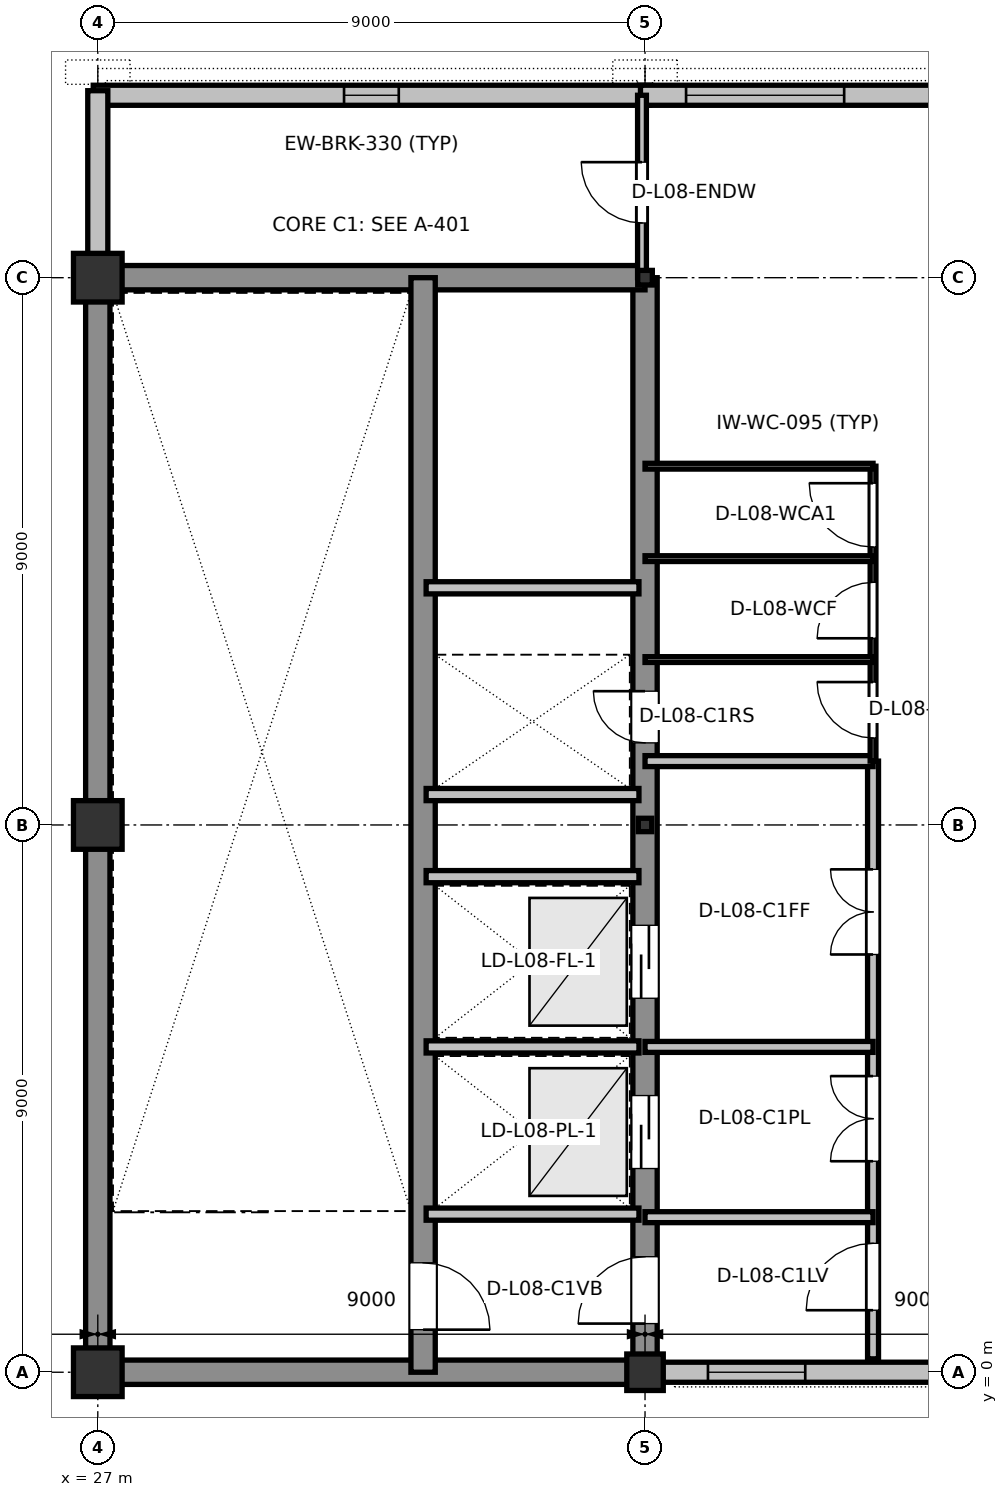
"""IFC4 building model, lengths in metres.
Left out: names, types, materials, properties, quantities, classifications, styles, units other than length and angle.
Written with IfcOpenShell. Run it as: python <this file> out.ifc"""

import sys

from ifc_helpers import new_model, si_unit, direction, frame, frame_2d, origin, origin_2d, place, context, subcontext, project, spatial, rectangle, hollow_rectangle, i_section, extrude, element, fill, save


model = new_model("IFC4")
c1 = context("Model", 3, precision=1e-05, world=origin(), true_north=direction((0.0, 1.0)))
c2 = subcontext(c1, "Body", "Model", "MODEL_VIEW")
j1 = project(units=[si_unit("LENGTHUNIT", "METRE"), si_unit("PLANEANGLEUNIT", "RADIAN")], contexts=[c1])
p1 = place(None, origin())
s1 = spatial("IfcSite", under=j1, at=p1, CompositionType="ELEMENT")
p2 = place(p1, origin())
s2 = spatial("IfcBuilding", under=s1, at=p2, CompositionType="ELEMENT")
p3 = place(p2, frame((0.0, 0.0, 36.0)))
s3 = spatial("IfcBuildingStorey", under=s2, at=p3, CompositionType="ELEMENT", Elevation=36.0)
for number, where, z_axis, x_axis in (
    (1, (27.0, 0.0, 0.0), (0.0, 0.0, 1.0), (1.0, 0.0, 0.0)),
    (2, (27.0, 9.0, 0.0), (0.0, 0.0, 1.0), (1.0, 0.0, 0.0)),
    (3, (27.0, 18.0, 0.0), (0.0, 0.0, 1.0), (1.0, 0.0, 0.0)),
):
    element("IfcColumn", number, at=place(p3, frame(where, z_axis=z_axis, x_axis=x_axis)), inside=s3, PredefinedType="COLUMN", context=c2, shape_type="SweptSolid", body=[
        extrude(rectangle(XDim=0.8, YDim=0.8, at=origin_2d()), origin(), (0.0, 0.0, 1.0), 4.2),
    ])
p4 = place(p3, frame((36.0, 0.0, 0.0), z_axis=(0.0, 0.0, 1.0), x_axis=(1.0, 0.0, 0.0)))
e4 = element("IfcColumn", 4, at=p4, inside=s3, PredefinedType="COLUMN", context=c2, shape_type="SweptSolid", body=[
    extrude(rectangle(XDim=0.6, YDim=0.6, at=origin_2d()), origin(), (0.0, 0.0, 1.0), 4.2),
])
p5 = place(p3, frame((36.0, 9.0, 0.0), z_axis=(0.0, 0.0, 1.0), x_axis=(1.0, 0.0, 0.0)))
e5 = element("IfcColumn", 5, at=p5, inside=s3, PredefinedType="COLUMN", context=c2, shape_type="SweptSolid", body=[
    extrude(hollow_rectangle(XDim=0.22, YDim=0.22, WallThickness=0.012, at=origin_2d()), origin(), (0.0, 0.0, 1.0), 4.2),
])
p6 = place(p3, frame((36.0, 18.0, 0.0), z_axis=(0.0, 0.0, 1.0), x_axis=(1.0, 0.0, 0.0)))
e6 = element("IfcColumn", 6, at=p6, inside=s3, PredefinedType="COLUMN", context=c2, shape_type="SweptSolid", body=[
    extrude(i_section(OverallWidth=0.24, OverallDepth=0.24, WebThickness=0.01, FlangeThickness=0.017, at=origin_2d()), origin(), (0.0, 0.0, 1.0), 4.2),
])
p7 = place(p3, frame((36.075, 21.0, 0.0), z_axis=(0.0, 0.0, 1.0), x_axis=(-1.0, 0.0, 0.0)))
e7 = element("IfcWall", 7, at=p7, inside=s3, PredefinedType="STANDARD", context=c2, shape_type="SweptSolid", body=[
    extrude(rectangle(XDim=9.15, YDim=0.33, at=frame_2d((4.575, 0.0))), origin(), (0.0, 0.0, 1.0), 3.94),
])
p8 = place(p7, frame((4.125, 0.0, 0.9)))
e8 = element("IfcOpeningElement", 8, at=p8, cuts=e7, PredefinedType="OPENING", context=c2, shape_type="SweptSolid", body=[
    extrude(rectangle(XDim=0.9, YDim=1.65, at=frame_2d((0.45, 0.825))), frame((0.0, 0.175, 0.0), z_axis=(0.0, -1.0, 0.0), x_axis=(1.0, 0.0, 0.0)), (0.0, 0.0, 1.0), 0.35),
])
p9 = place(p3, frame((45.075, 21.0, 0.0), z_axis=(0.0, 0.0, 1.0), x_axis=(-1.0, 0.0, 0.0)))
e9 = element("IfcWall", 9, at=p9, inside=s3, PredefinedType="STANDARD", context=c2, shape_type="SweptSolid", body=[
    extrude(rectangle(XDim=9.15, YDim=0.33, at=frame_2d((4.575, 0.0))), origin(), (0.0, 0.0, 1.0), 3.94),
])
p10 = place(p9, frame((5.8, 0.0, 0.9)))
e10 = element("IfcOpeningElement", 10, at=p10, cuts=e9, PredefinedType="OPENING", context=c2, shape_type="SweptSolid", body=[
    extrude(rectangle(XDim=2.6, YDim=1.8, at=frame_2d((1.3, 0.9))), frame((0.0, 0.175, 0.0), z_axis=(0.0, -1.0, 0.0), x_axis=(1.0, 0.0, 0.0)), (0.0, 0.0, 1.0), 0.35),
])
p11 = place(p3, frame((27.0, 21.075, 0.0), z_axis=(0.0, 0.0, 1.0), x_axis=(0.0, -1.0, 0.0)))
e11 = element("IfcWall", 11, at=p11, inside=s3, PredefinedType="STANDARD", context=c2, shape_type="SweptSolid", body=[
    extrude(rectangle(XDim=2.69, YDim=0.33, at=frame_2d((1.345, 0.0))), origin(), (0.0, 0.0, 1.0), 3.94),
])
p12 = place(p3, frame((36.285, 0.0, 0.0), z_axis=(0.0, 0.0, 1.0), x_axis=(1.0, 0.0, 0.0)))
e12 = element("IfcWall", 12, at=p12, inside=s3, PredefinedType="STANDARD", context=c2, shape_type="SweptSolid", body=[
    extrude(rectangle(XDim=8.43, YDim=0.33, at=frame_2d((4.215, 0.0))), origin(), (0.0, 0.0, 1.0), 3.755),
])
p13 = place(p12, frame((0.75, 0.0, 0.9)))
e13 = element("IfcOpeningElement", 13, at=p13, cuts=e12, PredefinedType="OPENING", context=c2, shape_type="SweptSolid", body=[
    extrude(rectangle(XDim=1.6, YDim=1.5, at=frame_2d((0.8, 0.75))), frame((0.0, 0.175, 0.0), z_axis=(0.0, -1.0, 0.0), x_axis=(1.0, 0.0, 0.0)), (0.0, 0.0, 1.0), 0.35),
])
p14 = place(p3, frame((27.0, 0.0, 0.0), z_axis=(0.0, 0.0, 1.0), x_axis=(1.0, 0.0, 0.0)))
e14 = element("IfcWall", 14, at=p14, inside=s3, PredefinedType="SHEAR", context=c2, shape_type="SweptSolid", body=[
    extrude(rectangle(XDim=9.0, YDim=0.4, at=frame_2d((4.5, 0.0))), origin(), (0.0, 0.0, 1.0), 3.96),
])
p15 = place(p3, frame((36.0, 0.0, 0.0), z_axis=(0.0, 0.0, 1.0), x_axis=(0.0, 1.0, 0.0)))
e15 = element("IfcWall", 15, at=p15, inside=s3, PredefinedType="SHEAR", context=c2, shape_type="SweptSolid", body=[
    extrude(rectangle(XDim=18.0, YDim=0.4, at=frame_2d((9.0, 0.0))), origin(), (0.0, 0.0, 1.0), 3.96),
])
p16 = place(p15, frame((0.8, 0.0, 0.0)))
e16 = element("IfcOpeningElement", 16, at=p16, cuts=e15, PredefinedType="OPENING", context=c2, shape_type="SweptSolid", body=[
    extrude(rectangle(XDim=1.1, YDim=2.16, at=frame_2d((0.55, 1.08))), frame((0.0, 0.21, 0.0), z_axis=(0.0, -1.0, 0.0), x_axis=(1.0, 0.0, 0.0)), (0.0, 0.0, 1.0), 0.42),
])
p17 = place(p15, frame((3.35, 0.0, 0.0)))
e17 = element("IfcOpeningElement", 17, at=p17, cuts=e15, PredefinedType="OPENING", context=c2, shape_type="SweptSolid", body=[
    extrude(rectangle(XDim=1.2, YDim=2.2, at=frame_2d((0.6, 1.1))), frame((0.0, 0.21, 0.0), z_axis=(0.0, -1.0, 0.0), x_axis=(1.0, 0.0, 0.0)), (0.0, 0.0, 1.0), 0.42),
])
p18 = place(p15, frame((6.15, 0.0, 0.0)))
e18 = element("IfcOpeningElement", 18, at=p18, cuts=e15, PredefinedType="OPENING", context=c2, shape_type="SweptSolid", body=[
    extrude(rectangle(XDim=1.2, YDim=2.2, at=frame_2d((0.6, 1.1))), frame((0.0, 0.21, 0.0), z_axis=(0.0, -1.0, 0.0), x_axis=(1.0, 0.0, 0.0)), (0.0, 0.0, 1.0), 0.42),
])
p19 = place(p15, frame((10.35, 0.0, 0.0)))
e19 = element("IfcOpeningElement", 19, at=p19, cuts=e15, PredefinedType="OPENING", context=c2, shape_type="SweptSolid", body=[
    extrude(rectangle(XDim=0.85, YDim=2.1, at=frame_2d((0.425, 1.05))), frame((0.0, 0.21, 0.0), z_axis=(0.0, -1.0, 0.0), x_axis=(1.0, 0.0, 0.0)), (0.0, 0.0, 1.0), 0.42),
])
p20 = place(p3, frame((36.0, 18.0, 0.0), z_axis=(0.0, 0.0, 1.0), x_axis=(-1.0, 0.0, 0.0)))
e20 = element("IfcWall", 20, at=p20, inside=s3, PredefinedType="SHEAR", context=c2, shape_type="SweptSolid", body=[
    extrude(rectangle(XDim=9.0, YDim=0.4, at=frame_2d((4.5, 0.0))), origin(), (0.0, 0.0, 1.0), 3.96),
])
p21 = place(p3, frame((27.0, 18.0, 0.0), z_axis=(0.0, 0.0, 1.0), x_axis=(0.0, -1.0, 0.0)))
e21 = element("IfcWall", 21, at=p21, inside=s3, PredefinedType="SHEAR", context=c2, shape_type="SweptSolid", body=[
    extrude(rectangle(XDim=18.0, YDim=0.4, at=frame_2d((9.0, 0.0))), origin(), (0.0, 0.0, 1.0), 3.96),
])
p22 = place(p3, frame((32.35, 0.0, 0.0), z_axis=(0.0, 0.0, 1.0), x_axis=(0.0, 1.0, 0.0)))
e22 = element("IfcWall", 22, at=p22, inside=s3, PredefinedType="SHEAR", context=c2, shape_type="SweptSolid", body=[
    extrude(rectangle(XDim=18.0, YDim=0.4, at=frame_2d((9.0, 0.0))), origin(), (0.0, 0.0, 1.0), 3.96),
])
p23 = place(p22, frame((0.7, 0.0, 0.0)))
e23 = element("IfcOpeningElement", 23, at=p23, cuts=e22, PredefinedType="OPENING", context=c2, shape_type="SweptSolid", body=[
    extrude(rectangle(XDim=1.1, YDim=2.16, at=frame_2d((0.55, 1.08))), frame((0.0, 0.21, 0.0), z_axis=(0.0, -1.0, 0.0), x_axis=(1.0, 0.0, 0.0)), (0.0, 0.0, 1.0), 0.42),
])
for number, where, z_axis, x_axis in (
    (24, (32.4, 2.6, 0.0), (0.0, 0.0, 1.0), (1.0, 0.0, 0.0)),
    (25, (32.4, 5.35, 0.0), (0.0, 0.0, 1.0), (1.0, 0.0, 0.0)),
    (26, (32.4, 8.15, 0.0), (0.0, 0.0, 1.0), (1.0, 0.0, 0.0)),
    (27, (32.4, 9.5, 0.0), (0.0, 0.0, 1.0), (1.0, 0.0, 0.0)),
    (28, (32.4, 12.9, 0.0), (0.0, 0.0, 1.0), (1.0, 0.0, 0.0)),
):
    element("IfcWall", number, at=place(p3, frame(where, z_axis=z_axis, x_axis=x_axis)), inside=s3, PredefinedType="PARTITIONING", context=c2, shape_type="SweptSolid", body=[
        extrude(rectangle(XDim=3.5, YDim=0.2, at=frame_2d((1.75, 0.0))), origin(), (0.0, 0.0, 1.0), 3.96),
    ])
p24 = place(p3, frame((39.75, 0.22, 0.0), z_axis=(0.0, 0.0, 1.0), x_axis=(0.0, 1.0, 0.0)))
e29 = element("IfcWall", 29, at=p24, inside=s3, PredefinedType="PARTITIONING", context=c2, shape_type="SweptSolid", body=[
    extrude(rectangle(XDim=9.83, YDim=0.18, at=frame_2d((4.915, 0.0))), origin(), (0.0, 0.0, 1.0), 3.96),
])
p25 = place(p24, frame((0.8, 0.0, 0.0)))
e30 = element("IfcOpeningElement", 30, at=p25, cuts=e29, PredefinedType="OPENING", context=c2, shape_type="SweptSolid", body=[
    extrude(rectangle(XDim=1.1, YDim=2.16, at=frame_2d((0.55, 1.08))), frame((0.0, 0.1, 0.0), z_axis=(0.0, -1.0, 0.0), x_axis=(1.0, 0.0, 0.0)), (0.0, 0.0, 1.0), 0.2),
])
p26 = place(p24, frame((3.25, 0.0, 0.0)))
e31 = element("IfcOpeningElement", 31, at=p26, cuts=e29, PredefinedType="OPENING", context=c2, shape_type="SweptSolid", body=[
    extrude(rectangle(XDim=1.4, YDim=2.2, at=frame_2d((0.7, 1.1))), frame((0.0, 0.1, 0.0), z_axis=(0.0, -1.0, 0.0), x_axis=(1.0, 0.0, 0.0)), (0.0, 0.0, 1.0), 0.2),
])
p27 = place(p24, frame((6.65, 0.0, 0.0)))
e32 = element("IfcOpeningElement", 32, at=p27, cuts=e29, PredefinedType="OPENING", context=c2, shape_type="SweptSolid", body=[
    extrude(rectangle(XDim=1.4, YDim=2.2, at=frame_2d((0.7, 1.1))), frame((0.0, 0.1, 0.0), z_axis=(0.0, -1.0, 0.0), x_axis=(1.0, 0.0, 0.0)), (0.0, 0.0, 1.0), 0.2),
])
for number, where, z_axis, x_axis in (
    (33, (36.0, 2.55, 0.0), (0.0, 0.0, 1.0), (1.0, 0.0, 0.0)),
    (34, (36.0, 5.35, 0.0), (0.0, 0.0, 1.0), (1.0, 0.0, 0.0)),
    (35, (36.0, 10.05, 0.0), (0.0, 0.0, 1.0), (1.0, 0.0, 0.0)),
):
    element("IfcWall", number, at=place(p3, frame(where, z_axis=z_axis, x_axis=x_axis)), inside=s3, PredefinedType="PARTITIONING", context=c2, shape_type="SweptSolid", body=[
        extrude(rectangle(XDim=3.75, YDim=0.18, at=frame_2d((1.875, 0.0))), origin(), (0.0, 0.0, 1.0), 3.96),
    ])
p28 = place(p3, frame((39.75, 10.05, 0.0), z_axis=(0.0, 0.0, 1.0), x_axis=(0.0, 1.0, 0.0)))
e36 = element("IfcWall", 36, at=p28, inside=s3, PredefinedType="PARTITIONING", context=c2, shape_type="SweptSolid", body=[
    extrude(rectangle(XDim=4.85, YDim=0.095, at=frame_2d((2.425, 0.0))), origin(), (0.0, 0.0, 1.0), 3.96),
])
p29 = place(p28, frame((0.38, 0.0, 0.0)))
e37 = element("IfcOpeningElement", 37, at=p29, cuts=e36, PredefinedType="OPENING", context=c2, shape_type="SweptSolid", body=[
    extrude(rectangle(XDim=0.92, YDim=2.1, at=frame_2d((0.46, 1.05))), frame((0.0, 0.057, 0.0), z_axis=(0.0, -1.0, 0.0), x_axis=(1.0, 0.0, 0.0)), (0.0, 0.0, 1.0), 0.115),
])
p30 = place(p28, frame((2.02, 0.0, 0.0)))
e38 = element("IfcOpeningElement", 38, at=p30, cuts=e36, PredefinedType="OPENING", context=c2, shape_type="SweptSolid", body=[
    extrude(rectangle(XDim=0.92, YDim=2.1, at=frame_2d((0.46, 1.05))), frame((0.0, 0.057, 0.0), z_axis=(0.0, -1.0, 0.0), x_axis=(1.0, 0.0, 0.0)), (0.0, 0.0, 1.0), 0.115),
])
p31 = place(p28, frame((3.52, 0.0, 0.0)))
e39 = element("IfcOpeningElement", 39, at=p31, cuts=e36, PredefinedType="OPENING", context=c2, shape_type="SweptSolid", body=[
    extrude(rectangle(XDim=1.05, YDim=2.13, at=frame_2d((0.525, 1.065))), frame((0.0, 0.057, 0.0), z_axis=(0.0, -1.0, 0.0), x_axis=(1.0, 0.0, 0.0)), (0.0, 0.0, 1.0), 0.115),
])
for number, where, z_axis, x_axis in (
    (40, (36.0, 11.72, 0.0), (0.0, 0.0, 1.0), (1.0, 0.0, 0.0)),
    (41, (36.0, 13.38, 0.0), (0.0, 0.0, 1.0), (1.0, 0.0, 0.0)),
):
    element("IfcWall", number, at=place(p3, frame(where, z_axis=z_axis, x_axis=x_axis)), inside=s3, PredefinedType="PARTITIONING", context=c2, shape_type="SweptSolid", body=[
        extrude(rectangle(XDim=3.75, YDim=0.095, at=frame_2d((1.875, 0.0))), origin(), (0.0, 0.0, 1.0), 3.96),
    ])
p32 = place(p3, frame((36.0, 14.9, 0.0), z_axis=(0.0, 0.0, 1.0), x_axis=(1.0, 0.0, 0.0)))
e42 = element("IfcWall", 42, at=p32, inside=s3, PredefinedType="PARTITIONING", context=c2, shape_type="SweptSolid", body=[
    extrude(rectangle(XDim=3.75, YDim=0.095, at=frame_2d((1.875, 0.0))), origin(), (0.0, 0.0, 1.0), 3.765),
])
p33 = place(p3, frame((35.95, 18.0, 0.0), z_axis=(0.0, 0.0, 1.0), x_axis=(0.0, 1.0, 0.0)))
e43 = element("IfcWall", 43, at=p33, inside=s3, PredefinedType="PARTITIONING", context=c2, shape_type="SweptSolid", body=[
    extrude(rectangle(XDim=3.0, YDim=0.145, at=frame_2d((1.5, 0.0))), origin(), (0.0, 0.0, 1.0), 3.96),
])
p34 = place(p33, frame((0.9, 0.0, 0.0)))
e44 = element("IfcOpeningElement", 44, at=p34, cuts=e43, PredefinedType="OPENING", context=c2, shape_type="SweptSolid", body=[
    extrude(rectangle(XDim=1.0, YDim=2.14, at=frame_2d((0.5, 1.07))), frame((0.0, 0.083, 0.0), z_axis=(0.0, -1.0, 0.0), x_axis=(1.0, 0.0, 0.0)), (0.0, 0.0, 1.0), 0.165),
])
p35 = place(p8, origin())
e45 = element("IfcWindow", 45, at=p35, inside=s3, PartitioningType="SINGLE_PANEL", PredefinedType="WINDOW", context=c2, shape_type="SweptSolid", body=[
    extrude(rectangle(XDim=0.9, YDim=1.65, at=frame_2d((0.45, 0.825))), frame((0.0, 0.03, 0.0), z_axis=(0.0, -1.0, 0.0), x_axis=(1.0, 0.0, 0.0)), (0.0, 0.0, 1.0), 0.06),
])
fill(e8, e45)
p36 = place(p10, origin())
e46 = element("IfcWindow", 46, at=p36, inside=s3, PartitioningType="SINGLE_PANEL", PredefinedType="WINDOW", context=c2, shape_type="SweptSolid", body=[
    extrude(rectangle(XDim=2.6, YDim=1.8, at=frame_2d((1.3, 0.9))), frame((0.0, 0.03, 0.0), z_axis=(0.0, -1.0, 0.0), x_axis=(1.0, 0.0, 0.0)), (0.0, 0.0, 1.0), 0.06),
])
fill(e10, e46)
p37 = place(p13, origin())
e47 = element("IfcWindow", 47, at=p37, inside=s3, PartitioningType="SINGLE_PANEL", PredefinedType="WINDOW", context=c2, shape_type="SweptSolid", body=[
    extrude(rectangle(XDim=1.6, YDim=1.5, at=frame_2d((0.8, 0.75))), frame((0.0, 0.03, 0.0), z_axis=(0.0, -1.0, 0.0), x_axis=(1.0, 0.0, 0.0)), (0.0, 0.0, 1.0), 0.06),
])
fill(e13, e47)
p38 = place(p23, frame((1.1, 0.0, 0.0), z_axis=(0.0, 0.0, 1.0), x_axis=(-1.0, 0.0, 0.0)))
e48 = element("IfcDoor", 48, at=p38, inside=s3, OperationType="SINGLE_SWING_RIGHT", PredefinedType="DOOR", context=c2, shape_type="SweptSolid", body=[
    extrude(rectangle(XDim=1.1, YDim=2.16, at=frame_2d((0.55, 1.08))), frame((0.0, 0.025, 0.0), z_axis=(0.0, -1.0, 0.0), x_axis=(1.0, 0.0, 0.0)), (0.0, 0.0, 1.0), 0.05),
])
fill(e23, e48)
p39 = place(p16, origin())
e49 = element("IfcDoor", 49, at=p39, inside=s3, OperationType="SINGLE_SWING_LEFT", PredefinedType="DOOR", context=c2, shape_type="SweptSolid", body=[
    extrude(rectangle(XDim=1.1, YDim=2.16, at=frame_2d((0.55, 1.08))), frame((0.0, 0.025, 0.0), z_axis=(0.0, -1.0, 0.0), x_axis=(1.0, 0.0, 0.0)), (0.0, 0.0, 1.0), 0.05),
])
fill(e16, e49)
p40 = place(p17, origin())
e50 = element("IfcDoor", 50, at=p40, inside=s3, OperationType="SLIDING_TO_LEFT", PredefinedType="DOOR", context=c2, shape_type="SweptSolid", body=[
    extrude(rectangle(XDim=1.2, YDim=2.2, at=frame_2d((0.6, 1.1))), frame((0.0, 0.025, 0.0), z_axis=(0.0, -1.0, 0.0), x_axis=(1.0, 0.0, 0.0)), (0.0, 0.0, 1.0), 0.05),
])
fill(e17, e50)
p41 = place(p18, origin())
e51 = element("IfcDoor", 51, at=p41, inside=s3, OperationType="SLIDING_TO_LEFT", PredefinedType="DOOR", context=c2, shape_type="SweptSolid", body=[
    extrude(rectangle(XDim=1.2, YDim=2.2, at=frame_2d((0.6, 1.1))), frame((0.0, 0.025, 0.0), z_axis=(0.0, -1.0, 0.0), x_axis=(1.0, 0.0, 0.0)), (0.0, 0.0, 1.0), 0.05),
])
fill(e18, e51)
p42 = place(p19, origin())
e52 = element("IfcDoor", 52, at=p42, inside=s3, OperationType="SINGLE_SWING_RIGHT", PredefinedType="DOOR", context=c2, shape_type="SweptSolid", body=[
    extrude(rectangle(XDim=0.85, YDim=2.1, at=frame_2d((0.425, 1.05))), frame((0.0, 0.025, 0.0), z_axis=(0.0, -1.0, 0.0), x_axis=(1.0, 0.0, 0.0)), (0.0, 0.0, 1.0), 0.05),
])
fill(e19, e52)
p43 = place(p25, origin())
e53 = element("IfcDoor", 53, at=p43, inside=s3, OperationType="SINGLE_SWING_LEFT", PredefinedType="DOOR", context=c2, shape_type="SweptSolid", body=[
    extrude(rectangle(XDim=1.1, YDim=2.16, at=frame_2d((0.55, 1.08))), frame((0.0, 0.025, 0.0), z_axis=(0.0, -1.0, 0.0), x_axis=(1.0, 0.0, 0.0)), (0.0, 0.0, 1.0), 0.05),
])
fill(e30, e53)
p44 = place(p26, origin())
e54 = element("IfcDoor", 54, at=p44, inside=s3, OperationType="DOUBLE_DOOR_SINGLE_SWING", PredefinedType="DOOR", context=c2, shape_type="SweptSolid", body=[
    extrude(rectangle(XDim=1.4, YDim=2.2, at=frame_2d((0.7, 1.1))), frame((0.0, 0.025, 0.0), z_axis=(0.0, -1.0, 0.0), x_axis=(1.0, 0.0, 0.0)), (0.0, 0.0, 1.0), 0.05),
])
fill(e31, e54)
p45 = place(p27, origin())
e55 = element("IfcDoor", 55, at=p45, inside=s3, OperationType="DOUBLE_DOOR_SINGLE_SWING", PredefinedType="DOOR", context=c2, shape_type="SweptSolid", body=[
    extrude(rectangle(XDim=1.4, YDim=2.2, at=frame_2d((0.7, 1.1))), frame((0.0, 0.025, 0.0), z_axis=(0.0, -1.0, 0.0), x_axis=(1.0, 0.0, 0.0)), (0.0, 0.0, 1.0), 0.05),
])
fill(e32, e55)
p46 = place(p29, origin())
e56 = element("IfcDoor", 56, at=p46, inside=s3, OperationType="SINGLE_SWING_RIGHT", PredefinedType="DOOR", context=c2, shape_type="SweptSolid", body=[
    extrude(rectangle(XDim=0.92, YDim=2.1, at=frame_2d((0.46, 1.05))), frame((0.0, 0.025, 0.0), z_axis=(0.0, -1.0, 0.0), x_axis=(1.0, 0.0, 0.0)), (0.0, 0.0, 1.0), 0.05),
])
fill(e37, e56)
p47 = place(p30, origin())
e57 = element("IfcDoor", 57, at=p47, inside=s3, OperationType="SINGLE_SWING_LEFT", PredefinedType="DOOR", context=c2, shape_type="SweptSolid", body=[
    extrude(rectangle(XDim=0.92, YDim=2.1, at=frame_2d((0.46, 1.05))), frame((0.0, 0.025, 0.0), z_axis=(0.0, -1.0, 0.0), x_axis=(1.0, 0.0, 0.0)), (0.0, 0.0, 1.0), 0.05),
])
fill(e38, e57)
p48 = place(p31, origin())
e58 = element("IfcDoor", 58, at=p48, inside=s3, OperationType="SINGLE_SWING_RIGHT", PredefinedType="DOOR", context=c2, shape_type="SweptSolid", body=[
    extrude(rectangle(XDim=1.05, YDim=2.13, at=frame_2d((0.525, 1.065))), frame((0.0, 0.025, 0.0), z_axis=(0.0, -1.0, 0.0), x_axis=(1.0, 0.0, 0.0)), (0.0, 0.0, 1.0), 0.05),
])
fill(e39, e58)
p49 = place(p34, origin())
e59 = element("IfcDoor", 59, at=p49, inside=s3, OperationType="SINGLE_SWING_RIGHT", PredefinedType="DOOR", context=c2, shape_type="SweptSolid", body=[
    extrude(rectangle(XDim=1.0, YDim=2.14, at=frame_2d((0.5, 1.07))), frame((0.0, 0.025, 0.0), z_axis=(0.0, -1.0, 0.0), x_axis=(1.0, 0.0, 0.0)), (0.0, 0.0, 1.0), 0.05),
])
fill(e44, e59)
save(model, sys.argv[1])
